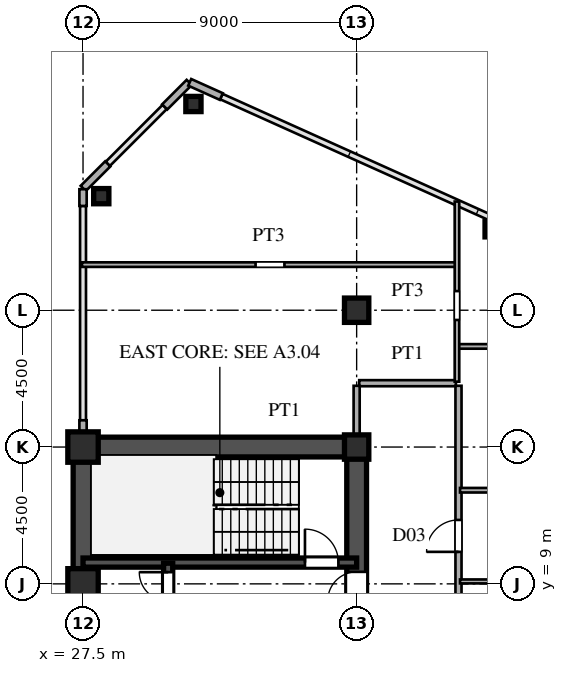
"""IFC4 building model, lengths in metres.
Left out: names, types, materials, properties, quantities, classifications, styles, units other than length and angle.
Written with IfcOpenShell. Run it as: python <this file> out.ifc"""

import sys

from ifc_helpers import new_model, si_unit, direction, frame, frame_2d, origin, origin_2d, place, context, subcontext, project, spatial, rectangle, hollow_rectangle, i_section, extrude, source, transform, mapped, element, fill, save


model = new_model("IFC4")
c1 = context("Model", 3, precision=1e-05, world=origin(), true_north=direction((0.0, 1.0)))
c2 = subcontext(c1, "Body", "Model", "MODEL_VIEW")
j1 = project(units=[si_unit("LENGTHUNIT", "METRE"), si_unit("PLANEANGLEUNIT", "RADIAN")], contexts=[c1])
p1 = place(None, origin())
s1 = spatial("IfcSite", under=j1, at=p1, CompositionType="ELEMENT")
p2 = place(p1, origin())
s2 = spatial("IfcBuilding", under=s1, at=p2, CompositionType="ELEMENT")
p3 = place(p2, frame((0.0, 0.0, 69.3)))
s3 = spatial("IfcBuildingStorey", under=s2, at=p3, CompositionType="ELEMENT", Elevation=69.3)
m1 = source(origin(), c2, "Body", "SweptSolid", [
    extrude(hollow_rectangle(XDim=1.0, YDim=1.0, WallThickness=0.042, at=origin_2d()), origin(), (0.0, 0.0, 1.0), 3.6),
])
for number, where, z_axis, x_axis in (
    (1, (27.5, 9.0, 0.0), (0.0, 0.0, 1.0), (1.0, 0.0, 0.0)),
    (2, (27.5, 13.5, 0.0), (0.0, 0.0, 1.0), (1.0, 0.0, 0.0)),
):
    element("IfcColumn", number, at=place(p3, frame(where, z_axis=z_axis, x_axis=x_axis)), inside=s3, PredefinedType="COLUMN", context=c2, shape_type="MappedRepresentation", body=[
        mapped(m1, transform((0.0, 0.0, 0.0), scale=1.0)),
    ])
m2 = source(origin(), c2, "Body", "SweptSolid", [
    extrude(i_section(OverallWidth=0.8, OverallDepth=0.8, WebThickness=0.032, FlangeThickness=0.05, at=origin_2d()), origin(), (0.0, 0.0, 1.0), 3.6),
])
for number, where, z_axis, x_axis in (
    (3, (36.5, 13.5, 0.0), (0.0, 0.0, 1.0), (1.0, 0.0, 0.0)),
    (4, (36.5, 18.0, 0.0), (0.0, 0.0, 1.0), (1.0, 0.0, 0.0)),
):
    element("IfcColumn", number, at=place(p3, frame(where, z_axis=z_axis, x_axis=x_axis)), inside=s3, PredefinedType="COLUMN", context=c2, shape_type="MappedRepresentation", body=[
        mapped(m2, transform((0.0, 0.0, 0.0), scale=1.0)),
    ])
m3 = source(origin(), c2, "Body", "SweptSolid", [
    extrude(hollow_rectangle(XDim=0.5, YDim=0.5, WallThickness=0.02, at=origin_2d()), origin(), (0.0, 0.0, 1.0), 3.6),
])
for number, where, z_axis, x_axis in (
    (5, (31.131, 24.783, 0.0), (0.0, 0.0, 1.0), (1.0, 0.0, 0.0)),
    (6, (28.1, 21.751, 0.0), (0.0, 0.0, 1.0), (1.0, 0.0, 0.0)),
    (7, (40.973, 20.661, 0.0), (0.0, 0.0, 1.0), (1.0, 0.0, 0.0)),
):
    element("IfcColumn", number, at=place(p3, frame(where, z_axis=z_axis, x_axis=x_axis)), inside=s3, PredefinedType="COLUMN", context=c2, shape_type="MappedRepresentation", body=[
        mapped(m3, transform((0.0, 0.0, 0.0), scale=1.0)),
    ])
p4 = place(p3, frame((32.049, 25.028, 0.0), z_axis=(0.0, 0.0, 1.0), x_axis=(-0.911929519623, 0.410346866979, 0.0)))
e8 = element("IfcWall", 8, at=p4, inside=s3, PredefinedType="SOLIDWALL", context=c2, shape_type="SweptSolid", body=[
    extrude(rectangle(XDim=1.14, YDim=0.24, at=frame_2d((0.57, 0.0))), origin(), (0.0, 0.0, 1.0), 3.38),
])
for number, where, z_axis, x_axis in (
    (9, (30.993, 25.493, 0.0), (0.0, 0.0, 1.0), (-0.707, -0.707, 0.0)),
    (10, (28.313, 22.813, 0.0), (0.0, 0.0, 1.0), (-0.707, -0.707, 0.0)),
):
    element("IfcWall", number, at=place(p3, frame(where, z_axis=z_axis, x_axis=x_axis)), inside=s3, PredefinedType="SOLIDWALL", context=c2, shape_type="SweptSolid", body=[
        extrude(rectangle(XDim=1.14, YDim=0.24, at=frame_2d((0.57, 0.0))), origin(), (0.0, 0.0, 1.0), 3.38),
    ])
p5 = place(p3, frame((27.5, 13.83, 0.0), z_axis=(0.0, 0.0, 1.0), x_axis=(0.0, 1.0, 0.0)))
e11 = element("IfcWall", 11, at=p5, inside=s3, PredefinedType="SOLIDWALL", context=c2, shape_type="SweptSolid", body=[
    extrude(rectangle(XDim=0.55, YDim=0.24, at=frame_2d((0.275, 0.0))), origin(), (0.0, 0.0, 1.0), 2.88),
])
p6 = place(p3, frame((27.5, 21.43, 0.0), z_axis=(0.0, 0.0, 1.0), x_axis=(0.0, 1.0, 0.0)))
e12 = element("IfcWall", 12, at=p6, inside=s3, PredefinedType="SOLIDWALL", context=c2, shape_type="SweptSolid", body=[
    extrude(rectangle(XDim=0.55, YDim=0.24, at=frame_2d((0.275, 0.0))), origin(), (0.0, 0.0, 1.0), 3.38),
])
p7 = place(p3, frame((27.5, 1.3, 0.0), z_axis=(0.0, 0.0, 1.0), x_axis=(0.0, 1.0, 0.0)))
e13 = element("IfcWall", 13, at=p7, inside=s3, PredefinedType="SHEAR", context=c2, shape_type="SweptSolid", body=[
    extrude(rectangle(XDim=12.2, YDim=0.65, at=frame_2d((6.1, 0.0))), origin(), (0.0, 0.0, 1.0), 3.38),
])
p8 = place(p3, frame((27.5, 13.5, 0.0), z_axis=(0.0, 0.0, 1.0), x_axis=(1.0, 0.0, 0.0)))
e14 = element("IfcWall", 14, at=p8, inside=s3, PredefinedType="SHEAR", context=c2, shape_type="SweptSolid", body=[
    extrude(rectangle(XDim=9.0, YDim=0.65, at=frame_2d((4.5, 0.0))), origin(), (0.0, 0.0, 1.0), 3.38),
])
p9 = place(p3, frame((36.5, 8.2, 0.0), z_axis=(0.0, 0.0, 1.0), x_axis=(0.0, 1.0, 0.0)))
e15 = element("IfcWall", 15, at=p9, inside=s3, PredefinedType="SHEAR", context=c2, shape_type="SweptSolid", body=[
    extrude(rectangle(XDim=5.45, YDim=0.65, at=frame_2d((2.725, 0.0))), origin(), (0.0, 0.0, 1.0), 3.38),
])
p10 = place(p9, frame((0.245, 0.0, 0.0)))
e16 = element("IfcOpeningElement", 16, at=p10, cuts=e15, PredefinedType="OPENING", context=c2, shape_type="SweptSolid", body=[
    extrude(rectangle(XDim=0.95, YDim=2.15, at=frame_2d((0.475, 1.075))), frame((0.0, 0.335, 0.0), z_axis=(0.0, -1.0, 0.0), x_axis=(1.0, 0.0, 0.0)), (0.0, 0.0, 1.0), 0.67),
])
p11 = place(p3, frame((27.5, 9.7, 0.0), z_axis=(0.0, 0.0, 1.0), x_axis=(1.0, 0.0, 0.0)))
e17 = element("IfcWall", 17, at=p11, inside=s3, PredefinedType="SHEAR", context=c2, shape_type="SweptSolid", body=[
    extrude(rectangle(XDim=9.0, YDim=0.3, at=frame_2d((4.5, 0.0))), origin(), (0.0, 0.0, 1.0), 3.38),
])
p12 = place(p11, frame((7.3, 0.0, 0.0)))
e18 = element("IfcOpeningElement", 18, at=p12, cuts=e17, PredefinedType="OPENING", context=c2, shape_type="SweptSolid", body=[
    extrude(rectangle(XDim=1.1, YDim=2.2, at=frame_2d((0.55, 1.1))), frame((0.0, 0.16, 0.0), z_axis=(0.0, -1.0, 0.0), x_axis=(1.0, 0.0, 0.0)), (0.0, 0.0, 1.0), 0.32),
])
p13 = place(p3, frame((30.3, 8.15, 0.0), z_axis=(0.0, 0.0, 1.0), x_axis=(0.0, 1.0, 0.0)))
e19 = element("IfcWall", 19, at=p13, inside=s3, PredefinedType="SHEAR", context=c2, shape_type="SweptSolid", body=[
    extrude(rectangle(XDim=1.53, YDim=0.3, at=frame_2d((0.765, 0.0))), origin(), (0.0, 0.0, 1.0), 3.38),
])
p14 = place(p13, frame((0.285, 0.0, 0.0)))
e20 = element("IfcOpeningElement", 20, at=p14, cuts=e19, PredefinedType="OPENING", context=c2, shape_type="SweptSolid", body=[
    extrude(rectangle(XDim=0.95, YDim=2.15, at=frame_2d((0.475, 1.075))), frame((0.0, 0.16, 0.0), z_axis=(0.0, -1.0, 0.0), x_axis=(1.0, 0.0, 0.0)), (0.0, 0.0, 1.0), 0.32),
])
p15 = place(p3, frame((39.9, 9.08, 0.0), z_axis=(0.0, 0.0, 1.0), x_axis=(1.0, 0.0, 0.0)))
e21 = element("IfcWall", 21, at=p15, inside=s3, PredefinedType="PARTITIONING", context=c2, shape_type="SweptSolid", body=[
    extrude(rectangle(XDim=5.55, YDim=0.13, at=frame_2d((2.775, 0.0))), origin(), (0.0, 0.0, 1.0), 3.38),
])
p16 = place(p15, frame((2.335, 0.0, 0.0)))
e22 = element("IfcOpeningElement", 22, at=p16, cuts=e21, PredefinedType="OPENING", context=c2, shape_type="SweptSolid", body=[
    extrude(rectangle(XDim=0.88, YDim=2.1, at=frame_2d((0.44, 1.05))), frame((0.0, 0.075, 0.0), z_axis=(0.0, -1.0, 0.0), x_axis=(1.0, 0.0, 0.0)), (0.0, 0.0, 1.0), 0.15),
])
p17 = place(p3, frame((39.9, 12.08, 0.0), z_axis=(0.0, 0.0, 1.0), x_axis=(1.0, 0.0, 0.0)))
e23 = element("IfcWall", 23, at=p17, inside=s3, PredefinedType="PARTITIONING", context=c2, shape_type="SweptSolid", body=[
    extrude(rectangle(XDim=5.55, YDim=0.15, at=frame_2d((2.775, 0.0))), origin(), (0.0, 0.0, 1.0), 3.38),
])
p18 = place(p17, frame((2.3, 0.0, 0.0)))
e24 = element("IfcOpeningElement", 24, at=p18, cuts=e23, PredefinedType="OPENING", context=c2, shape_type="SweptSolid", body=[
    extrude(rectangle(XDim=0.95, YDim=2.15, at=frame_2d((0.475, 1.075))), frame((0.0, 0.085, 0.0), z_axis=(0.0, -1.0, 0.0), x_axis=(1.0, 0.0, 0.0)), (0.0, 0.0, 1.0), 0.17),
])
p19 = place(p3, frame((36.585, 15.6, 0.0), z_axis=(0.0, 0.0, 1.0), x_axis=(1.0, 0.0, 0.0)))
e25 = element("IfcWall", 25, at=p19, inside=s3, PredefinedType="PARTITIONING", context=c2, shape_type="SweptSolid", body=[
    extrude(rectangle(XDim=3.18, YDim=0.2, at=frame_2d((1.59, 0.0))), origin(), (0.0, 0.0, 1.0), 3.38),
])
p20 = place(p3, frame((39.85, 16.81, 0.0), z_axis=(0.0, 0.0, 1.0), x_axis=(1.0, 0.0, 0.0)))
e26 = element("IfcWall", 26, at=p20, inside=s3, PredefinedType="PARTITIONING", context=c2, shape_type="SweptSolid", body=[
    extrude(rectangle(XDim=5.6, YDim=0.15, at=frame_2d((2.8, 0.0))), origin(), (0.0, 0.0, 1.0), 3.38),
])
p21 = place(p3, frame((27.465, 19.5, 0.0), z_axis=(0.0, 0.0, 1.0), x_axis=(1.0, 0.0, 0.0)))
e27 = element("IfcWall", 27, at=p21, inside=s3, PredefinedType="PARTITIONING", context=c2, shape_type="SweptSolid", body=[
    extrude(rectangle(XDim=12.285, YDim=0.15, at=frame_2d((6.143, 0.0))), origin(), (0.0, 0.0, 1.0), 3.38),
])
p22 = place(p21, frame((5.71, 0.0, 0.0)))
e28 = element("IfcOpeningElement", 28, at=p22, cuts=e27, PredefinedType="OPENING", context=c2, shape_type="SweptSolid", body=[
    extrude(rectangle(XDim=0.95, YDim=2.15, at=frame_2d((0.475, 1.075))), frame((0.0, 0.085, 0.0), z_axis=(0.0, -1.0, 0.0), x_axis=(1.0, 0.0, 0.0)), (0.0, 0.0, 1.0), 0.17),
])
p23 = place(p3, frame((36.5, 13.83, 0.0), z_axis=(0.0, 0.0, 1.0), x_axis=(0.0, 1.0, 0.0)))
e29 = element("IfcWall", 29, at=p23, inside=s3, PredefinedType="PARTITIONING", context=c2, shape_type="SweptSolid", body=[
    extrude(rectangle(XDim=1.685, YDim=0.2, at=frame_2d((0.842, 0.0))), origin(), (0.0, 0.0, 1.0), 2.68),
])
p24 = place(p3, frame((39.8, 15.65, 0.0), z_axis=(0.0, 0.0, 1.0), x_axis=(0.0, 1.0, 0.0)))
e30 = element("IfcWall", 30, at=p24, inside=s3, PredefinedType="PARTITIONING", context=c2, shape_type="SweptSolid", body=[
    extrude(rectangle(XDim=5.925, YDim=0.15, at=frame_2d((2.962, 0.0))), origin(), (0.0, 0.0, 1.0), 3.38),
])
p25 = place(p24, frame((2.029, 0.0, 0.0)))
e31 = element("IfcOpeningElement", 31, at=p25, cuts=e30, PredefinedType="OPENING", context=c2, shape_type="SweptSolid", body=[
    extrude(rectangle(XDim=0.95, YDim=2.15, at=frame_2d((0.475, 1.075))), frame((0.0, 0.085, 0.0), z_axis=(0.0, -1.0, 0.0), x_axis=(1.0, 0.0, 0.0)), (0.0, 0.0, 1.0), 0.17),
])
p26 = place(p3, frame((39.85, -15.515, 0.0), z_axis=(0.0, 0.0, 1.0), x_axis=(0.0, 1.0, 0.0)))
e32 = element("IfcWall", 32, at=p26, inside=s3, PredefinedType="PARTITIONING", context=c2, shape_type="SweptSolid", body=[
    extrude(rectangle(XDim=31.03, YDim=0.2, at=frame_2d((15.515, 0.0))), origin(), (0.0, 0.0, 1.0), 3.38),
])
p27 = place(p26, frame((2.94, 0.0, 0.0)))
e33 = element("IfcOpeningElement", 33, at=p27, cuts=e32, PredefinedType="OPENING", context=c2, shape_type="SweptSolid", body=[
    extrude(rectangle(XDim=1.05, YDim=2.25, at=frame_2d((0.525, 1.125))), frame((0.0, 0.11, 0.0), z_axis=(0.0, -1.0, 0.0), x_axis=(1.0, 0.0, 0.0)), (0.0, 0.0, 1.0), 0.22),
])
p28 = place(p26, frame((13.28, 0.0, 0.0)))
e34 = element("IfcOpeningElement", 34, at=p28, cuts=e32, PredefinedType="OPENING", context=c2, shape_type="SweptSolid", body=[
    extrude(rectangle(XDim=1.05, YDim=2.25, at=frame_2d((0.525, 1.125))), frame((0.0, 0.11, 0.0), z_axis=(0.0, -1.0, 0.0), x_axis=(1.0, 0.0, 0.0)), (0.0, 0.0, 1.0), 0.22),
])
p29 = place(p26, frame((25.567, 0.0, 0.0)))
e35 = element("IfcOpeningElement", 35, at=p29, cuts=e32, PredefinedType="OPENING", context=c2, shape_type="SweptSolid", body=[
    extrude(rectangle(XDim=1.05, YDim=2.25, at=frame_2d((0.525, 1.125))), frame((0.0, 0.11, 0.0), z_axis=(0.0, -1.0, 0.0), x_axis=(1.0, 0.0, 0.0)), (0.0, 0.0, 1.0), 0.22),
])
m4 = source(origin(), c2, "Body", "SweptSolid", [
    extrude(rectangle(XDim=0.95, YDim=2.15, at=frame_2d((0.475, 1.075))), frame((0.0, 0.025, 0.0), z_axis=(0.0, -1.0, 0.0), x_axis=(1.0, 0.0, 0.0)), (0.0, 0.0, 1.0), 0.05),
])
p30 = place(p10, origin())
e36 = element("IfcDoor", 36, at=p30, inside=s3, OperationType="SINGLE_SWING_LEFT", PredefinedType="DOOR", context=c2, shape_type="MappedRepresentation", body=[
    mapped(m4, transform((0.0, 0.0, 0.0), scale=1.0)),
])
fill(e16, e36)
m5 = source(origin(), c2, "Body", "SweptSolid", [
    extrude(rectangle(XDim=1.1, YDim=2.2, at=frame_2d((0.55, 1.1))), frame((0.0, 0.025, 0.0), z_axis=(0.0, -1.0, 0.0), x_axis=(1.0, 0.0, 0.0)), (0.0, 0.0, 1.0), 0.05),
])
p31 = place(p12, origin())
e37 = element("IfcDoor", 37, at=p31, inside=s3, OperationType="SINGLE_SWING_LEFT", PredefinedType="DOOR", context=c2, shape_type="MappedRepresentation", body=[
    mapped(m5, transform((0.0, 0.0, 0.0), scale=1.0)),
])
fill(e18, e37)
p32 = place(p14, origin())
e38 = element("IfcDoor", 38, at=p32, inside=s3, OperationType="SINGLE_SWING_RIGHT", PredefinedType="DOOR", context=c2, shape_type="MappedRepresentation", body=[
    mapped(m4, transform((0.0, 0.0, 0.0), scale=1.0)),
])
fill(e20, e38)
m6 = source(origin(), c2, "Body", "SweptSolid", [
    extrude(rectangle(XDim=1.05, YDim=2.25, at=frame_2d((0.525, 1.125))), frame((0.0, 0.025, 0.0), z_axis=(0.0, -1.0, 0.0), x_axis=(1.0, 0.0, 0.0)), (0.0, 0.0, 1.0), 0.05),
])
p33 = place(p29, origin())
e39 = element("IfcDoor", 39, at=p33, inside=s3, OperationType="SINGLE_SWING_LEFT", PredefinedType="DOOR", context=c2, shape_type="MappedRepresentation", body=[
    mapped(m6, transform((0.0, 0.0, 0.0), scale=1.0)),
])
fill(e35, e39)
save(model, sys.argv[1])
